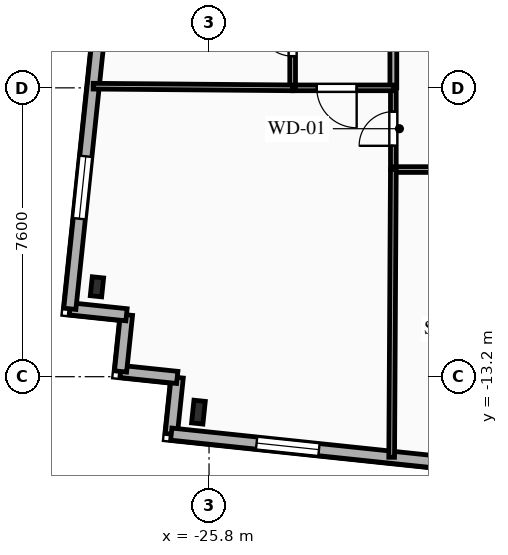
"""IFC4 building model, lengths in metres.
Left out: names, types, materials, properties, quantities, classifications, styles, units other than length and angle.
Written with IfcOpenShell. Run it as: python <this file> out.ifc"""

import sys

from ifc_helpers import new_model, si_unit, direction, frame, frame_2d, origin, origin_2d, place, context, subcontext, project, spatial, rectangle, i_section, extrude, element, fill, save


model = new_model("IFC4")
c1 = context("Model", 3, precision=1e-05, world=origin(), true_north=direction((0.0, 1.0)))
c2 = subcontext(c1, "Body", "Model", "MODEL_VIEW")
j1 = project(units=[si_unit("LENGTHUNIT", "METRE"), si_unit("PLANEANGLEUNIT", "RADIAN")], contexts=[c1])
p1 = place(None, origin())
s1 = spatial("IfcSite", under=j1, at=p1, CompositionType="ELEMENT")
p2 = place(p1, origin())
s2 = spatial("IfcBuilding", under=s1, at=p2, CompositionType="ELEMENT")
p3 = place(p2, frame((0.0, 0.0, 179.65)))
s3 = spatial("IfcBuildingStorey", under=s2, at=p3, CompositionType="ELEMENT", Elevation=179.65)
p4 = place(p3, frame((-26.079, -14.133, 0.0), z_axis=(0.0, 0.0, 1.0), x_axis=(0.994521895368, -0.104528463268, 0.0)))
e1 = element("IfcColumn", 1, at=p4, inside=s3, PredefinedType="COLUMN", context=c2, shape_type="SweptSolid", body=[
    extrude(i_section(OverallWidth=0.3, OverallDepth=0.6, WebThickness=0.015, FlangeThickness=0.03, FilletRadius=0.027, at=origin_2d()), origin(), (0.0, 0.0, 1.0), 3.35),
])
p5 = place(p3, frame((-28.749, -10.835, 0.0), z_axis=(0.0, 0.0, 1.0), x_axis=(0.994521895368, -0.104528463268, 0.0)))
e2 = element("IfcColumn", 2, at=p5, inside=s3, PredefinedType="COLUMN", context=c2, shape_type="SweptSolid", body=[
    extrude(i_section(OverallWidth=0.3, OverallDepth=0.5, WebThickness=0.014, FlangeThickness=0.028, FilletRadius=0.027, at=origin_2d()), origin(), (0.0, 0.0, 1.0), 3.35),
])
for number, where, z_axis, x_axis in (
    (3, (-26.793, -14.711, 0.0), (0.0, 0.0, 1.0), (0.104, 0.995, 0.0)),
    (4, (-26.637, -13.219, 0.0), (0.0, 0.0, 1.0), (-0.995, 0.104, 0.0)),
):
    element("IfcWall", number, at=place(p3, frame(where, z_axis=z_axis, x_axis=x_axis)), inside=s3, PredefinedType="SOLIDWALL", context=c2, shape_type="SweptSolid", body=[
        extrude(rectangle(XDim=1.5, YDim=0.32, at=frame_2d((0.75, 0.0))), origin(), (0.0, 0.0, 1.0), 3.04),
    ])
p6 = place(p3, frame((-28.128, -13.062, 0.0), z_axis=(0.0, 0.0, 1.0), x_axis=(0.104481464157, 0.994526834051, 0.0)))
e5 = element("IfcWall", 5, at=p6, inside=s3, PredefinedType="SOLIDWALL", context=c2, shape_type="SweptSolid", body=[
    extrude(rectangle(XDim=1.5, YDim=0.32, at=frame_2d((0.75, 0.0))), origin(), (0.0, 0.0, 1.0), 3.04),
])
p7 = place(p3, frame((-27.972, -11.571, 0.0), z_axis=(0.0, 0.0, 1.0), x_axis=(-0.994525057048, 0.104498377516, 0.0)))
e6 = element("IfcWall", 6, at=p7, inside=s3, PredefinedType="SOLIDWALL", context=c2, shape_type="SweptSolid", body=[
    extrude(rectangle(XDim=1.5, YDim=0.32, at=frame_2d((0.75, 0.0))), origin(), (0.0, 0.0, 1.0), 3.04),
])
p8 = place(p3, frame((-29.463, -11.414, 0.0), z_axis=(0.0, 0.0, 1.0), x_axis=(0.104530779244, 0.994521651947, 0.0)))
e7 = element("IfcWall", 7, at=p8, inside=s3, PredefinedType="SOLIDWALL", context=c2, shape_type="SweptSolid", body=[
    extrude(rectangle(XDim=28.8, YDim=0.32, at=frame_2d((14.4, 0.0))), origin(), (0.0, 0.0, 1.0), 3.04),
])
p9 = place(p8, frame((2.384, 0.0, 0.85)))
e8 = element("IfcOpeningElement", 8, at=p9, cuts=e7, PredefinedType="OPENING", context=c2, shape_type="SweptSolid", body=[
    extrude(rectangle(XDim=1.65, YDim=1.85, at=frame_2d((0.825, 0.925))), frame((0.0, 0.17, 0.0), z_axis=(0.0, -1.0, 0.0), x_axis=(1.0, 0.0, 0.0)), (0.0, 0.0, 1.0), 0.34),
])
p10 = place(p8, frame((8.973, 0.0, 0.85)))
e9 = element("IfcOpeningElement", 9, at=p10, cuts=e7, PredefinedType="OPENING", context=c2, shape_type="SweptSolid", body=[
    extrude(rectangle(XDim=1.95, YDim=1.85, at=frame_2d((0.975, 0.925))), frame((0.0, 0.17, 0.0), z_axis=(0.0, -1.0, 0.0), x_axis=(1.0, 0.0, 0.0)), (0.0, 0.0, 1.0), 0.34),
])
p11 = place(p8, frame((12.286, 0.0, 0.85)))
e10 = element("IfcOpeningElement", 10, at=p11, cuts=e7, PredefinedType="OPENING", context=c2, shape_type="SweptSolid", body=[
    extrude(rectangle(XDim=1.5, YDim=1.85, at=frame_2d((0.75, 0.925))), frame((0.0, 0.17, 0.0), z_axis=(0.0, -1.0, 0.0), x_axis=(1.0, 0.0, 0.0)), (0.0, 0.0, 1.0), 0.34),
])
p12 = place(p8, frame((15.094, 0.0, 0.85)))
e11 = element("IfcOpeningElement", 11, at=p12, cuts=e7, PredefinedType="OPENING", context=c2, shape_type="SweptSolid", body=[
    extrude(rectangle(XDim=1.5, YDim=1.85, at=frame_2d((0.75, 0.925))), frame((0.0, 0.17, 0.0), z_axis=(0.0, -1.0, 0.0), x_axis=(1.0, 0.0, 0.0)), (0.0, 0.0, 1.0), 0.34),
])
p13 = place(p8, frame((17.942, 0.0, 0.85)))
e12 = element("IfcOpeningElement", 12, at=p13, cuts=e7, PredefinedType="OPENING", context=c2, shape_type="SweptSolid", body=[
    extrude(rectangle(XDim=1.5, YDim=1.85, at=frame_2d((0.75, 0.925))), frame((0.0, 0.17, 0.0), z_axis=(0.0, -1.0, 0.0), x_axis=(1.0, 0.0, 0.0)), (0.0, 0.0, 1.0), 0.34),
])
p14 = place(p8, frame((23.442, 0.0, 0.85)))
e13 = element("IfcOpeningElement", 13, at=p14, cuts=e7, PredefinedType="OPENING", context=c2, shape_type="SweptSolid", body=[
    extrude(rectangle(XDim=1.65, YDim=1.85, at=frame_2d((0.825, 0.925))), frame((0.0, 0.17, 0.0), z_axis=(0.0, -1.0, 0.0), x_axis=(1.0, 0.0, 0.0)), (0.0, 0.0, 1.0), 0.34),
])
p15 = place(p3, frame((18.756, -19.498, 0.0), z_axis=(0.0, 0.0, 1.0), x_axis=(-0.994522060044, 0.104526896475, 0.0)))
e14 = element("IfcWall", 14, at=p15, inside=s3, PredefinedType="SOLIDWALL", context=c2, shape_type="SweptSolid", body=[
    extrude(rectangle(XDim=45.8, YDim=0.32, at=frame_2d((22.9, 0.0))), origin(), (0.0, 0.0, 1.0), 3.04),
])
p16 = place(p15, frame((1.137, 0.0, 0.85)))
e15 = element("IfcOpeningElement", 15, at=p16, cuts=e14, PredefinedType="OPENING", context=c2, shape_type="SweptSolid", body=[
    extrude(rectangle(XDim=1.65, YDim=1.85, at=frame_2d((0.825, 0.925))), frame((0.0, 0.17, 0.0), z_axis=(0.0, -1.0, 0.0), x_axis=(1.0, 0.0, 0.0)), (0.0, 0.0, 1.0), 0.34),
])
p17 = place(p15, frame((5.42, 0.0, 0.85)))
e16 = element("IfcOpeningElement", 16, at=p17, cuts=e14, PredefinedType="OPENING", context=c2, shape_type="SweptSolid", body=[
    extrude(rectangle(XDim=1.65, YDim=1.85, at=frame_2d((0.825, 0.925))), frame((0.0, 0.17, 0.0), z_axis=(0.0, -1.0, 0.0), x_axis=(1.0, 0.0, 0.0)), (0.0, 0.0, 1.0), 0.34),
])
p18 = place(p15, frame((13.232, 0.0, 0.85)))
e17 = element("IfcOpeningElement", 17, at=p18, cuts=e14, PredefinedType="OPENING", context=c2, shape_type="SweptSolid", body=[
    extrude(rectangle(XDim=2.2, YDim=1.85, at=frame_2d((1.1, 0.925))), frame((0.0, 0.17, 0.0), z_axis=(0.0, -1.0, 0.0), x_axis=(1.0, 0.0, 0.0)), (0.0, 0.0, 1.0), 0.34),
])
p19 = place(p15, frame((23.762, 0.0, 0.85)))
e18 = element("IfcOpeningElement", 18, at=p19, cuts=e14, PredefinedType="OPENING", context=c2, shape_type="SweptSolid", body=[
    extrude(rectangle(XDim=2.2, YDim=1.85, at=frame_2d((1.1, 0.925))), frame((0.0, 0.17, 0.0), z_axis=(0.0, -1.0, 0.0), x_axis=(1.0, 0.0, 0.0)), (0.0, 0.0, 1.0), 0.34),
])
p20 = place(p15, frame((31.763, 0.0, 0.85)))
e19 = element("IfcOpeningElement", 19, at=p20, cuts=e14, PredefinedType="OPENING", context=c2, shape_type="SweptSolid", body=[
    extrude(rectangle(XDim=1.65, YDim=1.85, at=frame_2d((0.825, 0.925))), frame((0.0, 0.17, 0.0), z_axis=(0.0, -1.0, 0.0), x_axis=(1.0, 0.0, 0.0)), (0.0, 0.0, 1.0), 0.34),
])
p21 = place(p15, frame((35.883, 0.0, 0.85)))
e20 = element("IfcOpeningElement", 20, at=p21, cuts=e14, PredefinedType="OPENING", context=c2, shape_type="SweptSolid", body=[
    extrude(rectangle(XDim=1.65, YDim=1.85, at=frame_2d((0.825, 0.925))), frame((0.0, 0.17, 0.0), z_axis=(0.0, -1.0, 0.0), x_axis=(1.0, 0.0, 0.0)), (0.0, 0.0, 1.0), 0.34),
])
p22 = place(p15, frame((41.892, 0.0, 0.85)))
e21 = element("IfcOpeningElement", 21, at=p22, cuts=e14, PredefinedType="OPENING", context=c2, shape_type="SweptSolid", body=[
    extrude(rectangle(XDim=1.65, YDim=1.85, at=frame_2d((0.825, 0.925))), frame((0.0, 0.17, 0.0), z_axis=(0.0, -1.0, 0.0), x_axis=(1.0, 0.0, 0.0)), (0.0, 0.0, 1.0), 0.34),
])
p23 = place(p3, frame((-20.95, -7.75, 0.0), z_axis=(0.0, 0.0, 1.0), x_axis=(0.0, 1.0, 0.0)))
e22 = element("IfcWall", 22, at=p23, inside=s3, PredefinedType="PARTITIONING", context=c2, shape_type="SweptSolid", body=[
    extrude(rectangle(XDim=2.15, YDim=0.15, at=frame_2d((1.075, 0.0))), origin(), (0.0, 0.0, 1.0), 3.04),
])
p24 = place(p23, frame((0.625, 0.0, 0.0)))
e23 = element("IfcOpeningElement", 23, at=p24, cuts=e22, PredefinedType="OPENING", context=c2, shape_type="SweptSolid", body=[
    extrude(rectangle(XDim=0.9, YDim=2.1, at=frame_2d((0.45, 1.05))), frame((0.0, 0.085, 0.0), z_axis=(0.0, -1.0, 0.0), x_axis=(1.0, 0.0, 0.0)), (0.0, 0.0, 1.0), 0.17),
])
p25 = place(p3, frame((-16.038, -7.75, 0.0), z_axis=(0.0, 0.0, 1.0), x_axis=(-1.0, 0.0, 0.0)))
e24 = element("IfcWall", 24, at=p25, inside=s3, PredefinedType="PARTITIONING", context=c2, shape_type="SweptSolid", body=[
    extrude(rectangle(XDim=4.912, YDim=0.15, at=frame_2d((2.456, 0.0))), origin(), (0.0, 0.0, 1.0), 3.04),
])
p26 = place(p25, frame((0.918, 0.0, 0.0)))
e25 = element("IfcOpeningElement", 25, at=p26, cuts=e24, PredefinedType="OPENING", context=c2, shape_type="SweptSolid", body=[
    extrude(rectangle(XDim=1.05, YDim=2.15, at=frame_2d((0.525, 1.075))), frame((0.0, 0.085, 0.0), z_axis=(0.0, -1.0, 0.0), x_axis=(1.0, 0.0, 0.0)), (0.0, 0.0, 1.0), 0.17),
])
p27 = place(p3, frame((-20.95, -5.6, 0.0), z_axis=(0.0, 0.0, 1.0), x_axis=(0.0, 1.0, 0.0)))
e26 = element("IfcWall", 26, at=p27, inside=s3, PredefinedType="PARTITIONING", context=c2, shape_type="SweptSolid", body=[
    extrude(rectangle(XDim=14.1, YDim=0.18, at=frame_2d((7.05, 0.0))), origin(), (0.0, 0.0, 1.0), 3.04),
])
p28 = place(p27, frame((5.058, 0.0, 0.0)))
e27 = element("IfcOpeningElement", 27, at=p28, cuts=e26, PredefinedType="OPENING", context=c2, shape_type="SweptSolid", body=[
    extrude(rectangle(XDim=1.0, YDim=2.15, at=frame_2d((0.5, 1.075))), frame((0.0, 0.1, 0.0), z_axis=(0.0, -1.0, 0.0), x_axis=(1.0, 0.0, 0.0)), (0.0, 0.0, 1.0), 0.2),
])
p29 = place(p3, frame((-20.95, -5.6, 0.0), z_axis=(0.0, 0.0, 1.0), x_axis=(-1.0, 0.0, 0.0)))
e28 = element("IfcWall", 28, at=p29, inside=s3, PredefinedType="PARTITIONING", context=c2, shape_type="SweptSolid", body=[
    extrude(rectangle(XDim=2.65, YDim=0.15, at=frame_2d((1.325, 0.0))), origin(), (0.0, 0.0, 1.0), 3.04),
])
p30 = place(p29, frame((0.965, 0.0, 0.0)))
e29 = element("IfcOpeningElement", 29, at=p30, cuts=e28, PredefinedType="OPENING", context=c2, shape_type="SweptSolid", body=[
    extrude(rectangle(XDim=1.05, YDim=2.15, at=frame_2d((0.525, 1.075))), frame((0.0, 0.085, 0.0), z_axis=(0.0, -1.0, 0.0), x_axis=(1.0, 0.0, 0.0)), (0.0, 0.0, 1.0), 0.17),
])
p31 = place(p3, frame((-23.6, -5.6, 0.0), z_axis=(0.0, 0.0, 1.0), x_axis=(0.0, 1.0, 0.0)))
e30 = element("IfcWall", 30, at=p31, inside=s3, PredefinedType="PLUMBINGWALL", context=c2, shape_type="SweptSolid", body=[
    extrude(rectangle(XDim=2.35, YDim=0.15, at=frame_2d((1.175, 0.0))), origin(), (0.0, 0.0, 1.0), 2.695),
])
p32 = place(p31, frame((0.834, 0.0, 0.0)))
e31 = element("IfcOpeningElement", 31, at=p32, cuts=e30, PredefinedType="OPENING", context=c2, shape_type="SweptSolid", body=[
    extrude(rectangle(XDim=0.9, YDim=2.1, at=frame_2d((0.45, 1.05))), frame((0.0, 0.085, 0.0), z_axis=(0.0, -1.0, 0.0), x_axis=(1.0, 0.0, 0.0)), (0.0, 0.0, 1.0), 0.17),
])
p33 = place(p3, frame((-28.848, -5.556, 0.0), z_axis=(0.0, 0.0, 1.0), x_axis=(0.999964936305, -0.008374136435, 0.0)))
e32 = element("IfcWall", 32, at=p33, inside=s3, PredefinedType="PLUMBINGWALL", context=c2, shape_type="SweptSolid", body=[
    extrude(rectangle(XDim=5.248, YDim=0.15, at=frame_2d((2.624, 0.0))), origin(), (0.0, 0.0, 1.0), 3.04),
])
p34 = place(p3, frame((-20.95, -7.75, 0.0), z_axis=(0.0, 0.0, 1.0), x_axis=(-0.005804668564, -0.99998315277, 0.0)))
e33 = element("IfcWall", 33, at=p34, inside=s3, PredefinedType="PARTITIONING", context=c2, shape_type="SweptSolid", body=[
    extrude(rectangle(XDim=7.571, YDim=0.15, at=frame_2d((3.785, 0.0))), origin(), (0.0, 0.0, 1.0), 3.04),
])
p35 = place(p9, origin())
e34 = element("IfcWindow", 34, at=p35, inside=s3, PartitioningType="SINGLE_PANEL", PredefinedType="WINDOW", context=c2, shape_type="SweptSolid", body=[
    extrude(rectangle(XDim=1.65, YDim=1.85, at=frame_2d((0.825, 0.925))), frame((0.0, 0.03, 0.0), z_axis=(0.0, -1.0, 0.0), x_axis=(1.0, 0.0, 0.0)), (0.0, 0.0, 1.0), 0.06),
])
fill(e8, e34)
p36 = place(p22, origin())
e35 = element("IfcWindow", 35, at=p36, inside=s3, PartitioningType="SINGLE_PANEL", PredefinedType="WINDOW", context=c2, shape_type="SweptSolid", body=[
    extrude(rectangle(XDim=1.65, YDim=1.85, at=frame_2d((0.825, 0.925))), frame((0.0, 0.03, 0.0), z_axis=(0.0, -1.0, 0.0), x_axis=(1.0, 0.0, 0.0)), (0.0, 0.0, 1.0), 0.06),
])
fill(e21, e35)
p37 = place(p24, origin())
e36 = element("IfcDoor", 36, at=p37, inside=s3, OperationType="SINGLE_SWING_LEFT", PredefinedType="DOOR", context=c2, shape_type="SweptSolid", body=[
    extrude(rectangle(XDim=0.9, YDim=2.1, at=frame_2d((0.45, 1.05))), frame((0.0, 0.025, 0.0), z_axis=(0.0, -1.0, 0.0), x_axis=(1.0, 0.0, 0.0)), (0.0, 0.0, 1.0), 0.05),
])
fill(e23, e36)
p38 = place(p30, origin())
e37 = element("IfcDoor", 37, at=p38, inside=s3, OperationType="SINGLE_SWING_LEFT", PredefinedType="DOOR", context=c2, shape_type="SweptSolid", body=[
    extrude(rectangle(XDim=1.05, YDim=2.15, at=frame_2d((0.525, 1.075))), frame((0.0, 0.025, 0.0), z_axis=(0.0, -1.0, 0.0), x_axis=(1.0, 0.0, 0.0)), (0.0, 0.0, 1.0), 0.05),
])
fill(e29, e37)
p39 = place(p32, origin())
e38 = element("IfcDoor", 38, at=p39, inside=s3, OperationType="SINGLE_SWING_RIGHT", PredefinedType="DOOR", context=c2, shape_type="SweptSolid", body=[
    extrude(rectangle(XDim=0.9, YDim=2.1, at=frame_2d((0.45, 1.05))), frame((0.0, 0.025, 0.0), z_axis=(0.0, -1.0, 0.0), x_axis=(1.0, 0.0, 0.0)), (0.0, 0.0, 1.0), 0.05),
])
fill(e31, e38)
save(model, sys.argv[1])
